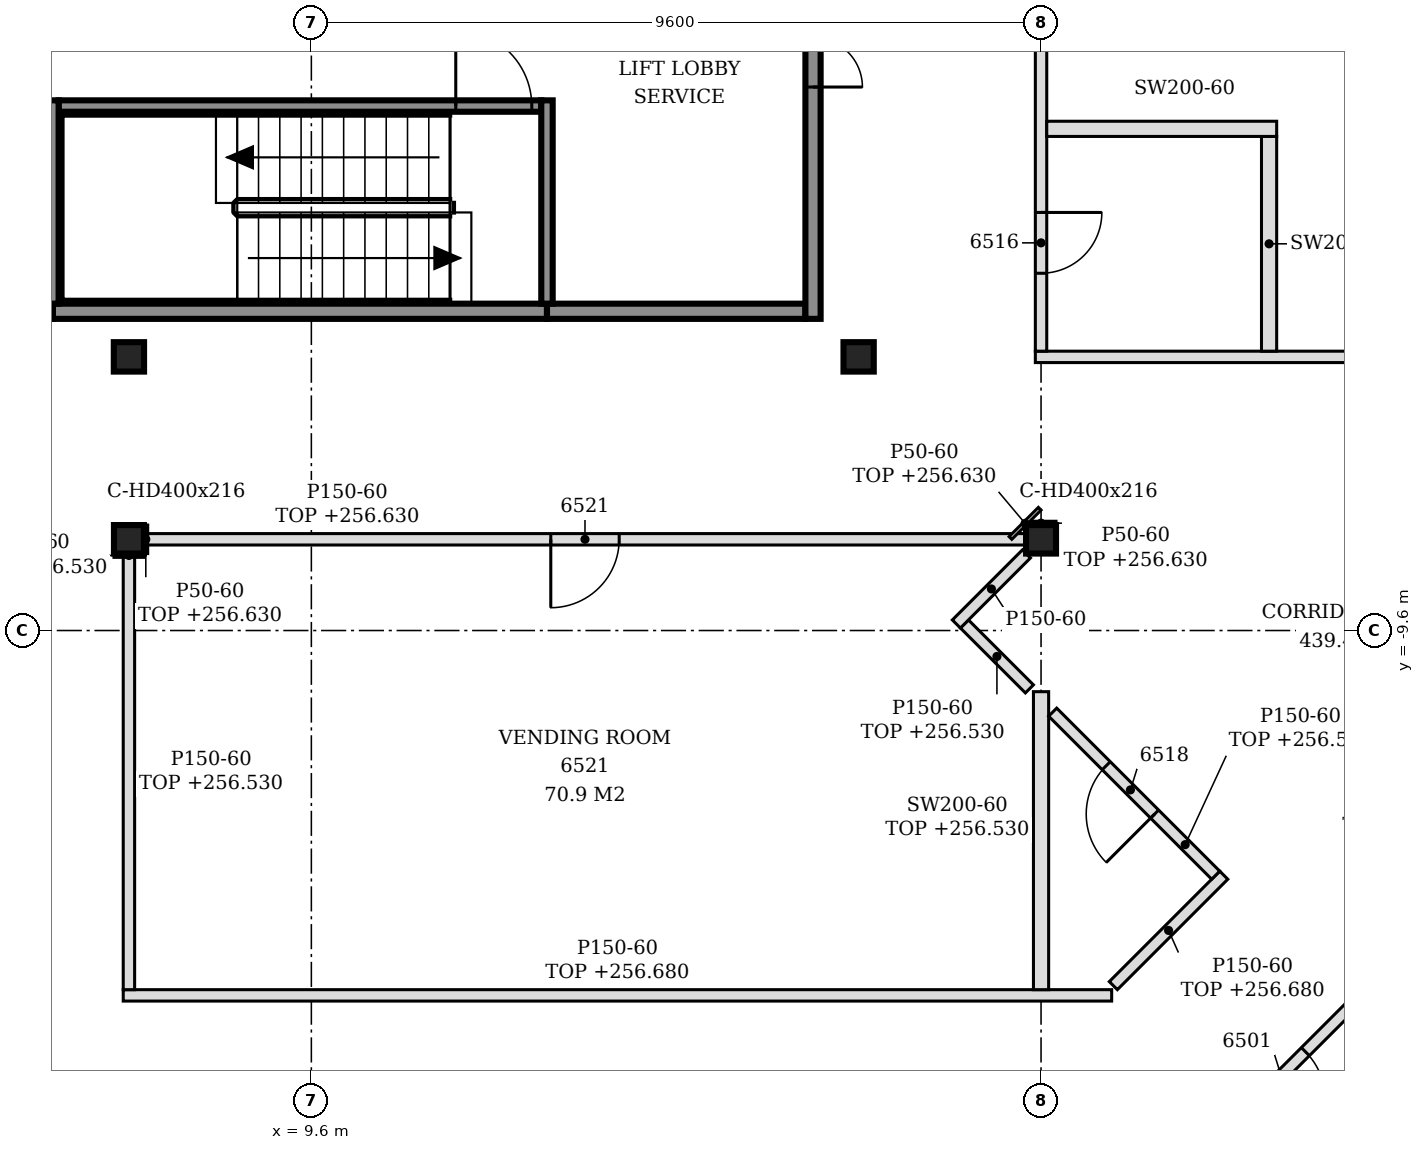
"""IFC4 building model, lengths in metres.
Left out: names, types, materials, properties, quantities, classifications, styles, units other than length and angle.
Written with IfcOpenShell. Run it as: python <this file> out.ifc"""

import sys

from ifc_helpers import new_model, si_unit, direction, frame, frame_2d, origin, origin_2d, place, context, subcontext, project, spatial, polyline, rectangle, i_section, outline, extrude, element, fill, save


model = new_model("IFC4")
c1 = context("Model", 3, precision=1e-05, world=origin(), true_north=direction((0.0, 1.0)))
c2 = subcontext(c1, "Body", "Model", "MODEL_VIEW")
j1 = project(units=[si_unit("LENGTHUNIT", "METRE"), si_unit("PLANEANGLEUNIT", "RADIAN")], contexts=[c1])
p1 = place(None, origin())
s1 = spatial("IfcSite", under=j1, at=p1, CompositionType="ELEMENT")
p2 = place(p1, origin())
s2 = spatial("IfcBuilding", under=s1, at=p2, CompositionType="ELEMENT")
p3 = place(p2, frame((0.0, 0.0, 253.8)))
s3 = spatial("IfcBuildingStorey", under=s2, at=p3, CompositionType="ELEMENT", Elevation=253.8)
for number, where, z_axis, x_axis in (
    (1, (7.2, -8.4, -0.15), (0.0, 0.0, 1.0), (1.0, 0.0, 0.0)),
    (2, (19.2, -8.4, -0.15), (0.0, 0.0, 1.0), (1.0, 0.0, 0.0)),
):
    element("IfcColumn", number, at=place(p3, frame(where, z_axis=z_axis, x_axis=x_axis)), inside=s3, PredefinedType="COLUMN", context=c2, shape_type="SweptSolid", body=[
        extrude(i_section(OverallWidth=0.394, OverallDepth=0.375, WebThickness=0.017, FlangeThickness=0.028, FilletRadius=0.015, at=origin_2d()), origin(), (0.0, 0.0, 1.0), 3.6),
    ])
for number, where, z_axis, x_axis in (
    (3, (7.2, -6.0, -0.15), (0.0, 0.0, 1.0), (1.0, 0.0, 0.0)),
    (4, (16.8, -6.0, -0.15), (0.0, 0.0, 1.0), (1.0, 0.0, 0.0)),
):
    element("IfcColumn", number, at=place(p3, frame(where, z_axis=z_axis, x_axis=x_axis)), inside=s3, PredefinedType="COLUMN", context=c2, shape_type="SweptSolid", body=[
        extrude(i_section(OverallWidth=0.398, OverallDepth=0.387, WebThickness=0.021, FlangeThickness=0.033, FilletRadius=0.015, at=origin_2d()), origin(), (0.0, 0.0, 1.0), 3.6),
    ])
p4 = place(p3, frame((6.2, -5.4, 0.0), z_axis=(0.0, 0.0, 1.0), x_axis=(1.0, 0.0, 0.0)))
e5 = element("IfcWall", 5, at=p4, inside=s3, PredefinedType="SOLIDWALL", context=c2, shape_type="SweptSolid", body=[
    extrude(rectangle(XDim=6.5, YDim=0.2, at=frame_2d((3.25, 0.0))), origin(), (0.0, 0.0, 1.0), 3.45),
])
p5 = place(p3, frame((12.7, -5.4, 0.0), z_axis=(0.0, 0.0, 1.0), x_axis=(1.0, 0.0, 0.0)))
e6 = element("IfcWall", 6, at=p5, inside=s3, PredefinedType="SOLIDWALL", context=c2, shape_type="SweptSolid", body=[
    extrude(rectangle(XDim=3.4, YDim=0.2, at=frame_2d((1.7, 0.0))), origin(), (0.0, 0.0, 1.0), 3.45),
])
p6 = place(p3, frame((6.275, -2.7, 0.0), z_axis=(0.0, 0.0, 1.0), x_axis=(1.0, 0.0, 0.0)))
e7 = element("IfcWall", 7, at=p6, inside=s3, PredefinedType="SOLIDWALL", context=c2, shape_type="SweptSolid", body=[
    extrude(rectangle(XDim=6.35, YDim=0.15, at=frame_2d((3.175, 0.0))), origin(), (0.0, 0.0, 1.0), 3.45),
])
p7 = place(p6, frame((5.225, 0.0, 0.0)))
e8 = element("IfcOpeningElement", 8, at=p7, cuts=e7, PredefinedType="OPENING", context=c2, shape_type="SweptSolid", body=[
    extrude(rectangle(XDim=1.0, YDim=2.1, at=frame_2d((0.5, 1.05))), frame((0.0, 0.085, 0.0), z_axis=(0.0, -1.0, 0.0), x_axis=(1.0, 0.0, 0.0)), (0.0, 0.0, 1.0), 0.17),
])
for number, where, z_axis, x_axis in (
    (9, (6.2, -5.3, 0.0), (0.0, 0.0, 1.0), (0.0, 1.0, 0.0)),
    (10, (12.7, -5.3, 0.0), (0.0, 0.0, 1.0), (0.0, 1.0, 0.0)),
):
    element("IfcWall", number, at=place(p3, frame(where, z_axis=z_axis, x_axis=x_axis)), inside=s3, PredefinedType="SOLIDWALL", context=c2, shape_type="SweptSolid", body=[
        extrude(rectangle(XDim=2.675, YDim=0.15, at=frame_2d((1.337, 0.0))), origin(), (0.0, 0.0, 1.0), 3.45),
    ])
p8 = place(p3, frame((16.2, -5.5, 0.0), z_axis=(0.0, 0.0, 1.0), x_axis=(0.0, 1.0, 0.0)))
e11 = element("IfcWall", 11, at=p8, inside=s3, PredefinedType="SOLIDWALL", context=c2, shape_type="SweptSolid", body=[
    extrude(rectangle(XDim=15.8, YDim=0.2, at=frame_2d((7.9, 0.0))), origin(), (0.0, 0.0, 1.0), 3.45),
])
p9 = place(p8, frame((3.05, 0.0, 0.0)))
e12 = element("IfcOpeningElement", 12, at=p9, cuts=e11, PredefinedType="OPENING", context=c2, shape_type="SweptSolid", body=[
    extrude(rectangle(XDim=1.3, YDim=2.1, at=frame_2d((0.65, 1.05))), frame((0.0, 0.11, 0.0), z_axis=(0.0, -1.0, 0.0), x_axis=(1.0, 0.0, 0.0)), (0.0, 0.0, 1.0), 0.22),
])
p10 = place(p8, frame((11.45, 0.0, 0.0)))
e13 = element("IfcOpeningElement", 13, at=p10, cuts=e11, PredefinedType="OPENING", context=c2, shape_type="SweptSolid", body=[
    extrude(rectangle(XDim=1.3, YDim=2.1, at=frame_2d((0.65, 1.05))), frame((0.0, 0.11, 0.0), z_axis=(0.0, -1.0, 0.0), x_axis=(1.0, 0.0, 0.0)), (0.0, 0.0, 1.0), 0.22),
])
p11 = place(p3, frame((21.146, -16.672, 0.0), z_axis=(0.0, 0.0, 1.0), x_axis=(0.707106781187, 0.707106781187, 0.0)))
e14 = element("IfcWall", 14, at=p11, inside=s3, PredefinedType="PARTITIONING", context=c2, shape_type="SweptSolid", body=[
    extrude(rectangle(XDim=17.719, YDim=0.15, at=frame_2d((8.859, 0.0))), origin(), (0.0, 0.0, 1.0), 2.88),
])
p12 = place(p11, frame((1.266, 0.0, 0.0)))
e15 = element("IfcOpeningElement", 15, at=p12, cuts=e14, PredefinedType="OPENING", context=c2, shape_type="SweptSolid", body=[
    extrude(rectangle(XDim=0.9, YDim=2.1, at=frame_2d((0.45, 1.05))), frame((0.0, 0.085, 0.0), z_axis=(0.0, -1.0, 0.0), x_axis=(1.0, 0.0, 0.0)), (0.0, 0.0, 1.0), 0.17),
])
p13 = place(p11, frame((8.611, 0.0, 0.0)))
e16 = element("IfcOpeningElement", 16, at=p13, cuts=e14, PredefinedType="OPENING", context=c2, shape_type="SweptSolid", body=[
    extrude(rectangle(XDim=0.9, YDim=2.1, at=frame_2d((0.45, 1.05))), frame((0.0, 0.085, 0.0), z_axis=(0.0, -1.0, 0.0), x_axis=(1.0, 0.0, 0.0)), (0.0, 0.0, 1.0), 0.17),
])
p14 = place(p11, frame((13.012, 0.0, 0.0)))
e17 = element("IfcOpeningElement", 17, at=p14, cuts=e14, PredefinedType="OPENING", context=c2, shape_type="SweptSolid", body=[
    extrude(rectangle(XDim=0.9, YDim=2.1, at=frame_2d((0.45, 1.05))), frame((0.0, 0.085, 0.0), z_axis=(0.0, -1.0, 0.0), x_axis=(1.0, 0.0, 0.0)), (0.0, 0.0, 1.0), 0.17),
])
p15 = place(p3, frame((7.125, -14.4, 0.0), z_axis=(0.0, 0.0, 1.0), x_axis=(1.0, 0.0, 0.0)))
e18 = element("IfcWall", 18, at=p15, inside=s3, PredefinedType="PARTITIONING", context=c2, shape_type="SweptSolid", body=[
    extrude(outline(polyline([(0.0, 0.0), (13.004, 0.0), (13.004, 2.88), (12.225, 2.88), (12.223, 2.73), (11.925, 2.73), (11.923, 2.88), (0.225, 2.88), (0.223, 2.73), (0.0, 2.73), (0.0, 0.0)])), frame((0.0, 0.075, 0.0), z_axis=(0.0, -1.0, 0.0), x_axis=(1.0, 0.0, 0.0)), (0.0, 0.0, 1.0), 0.15),
])
p16 = place(p3, frame((7.2, -14.325, 0.0), z_axis=(0.0, 0.0, 1.0), x_axis=(0.0, 1.0, 0.0)))
e19 = element("IfcWall", 19, at=p16, inside=s3, PredefinedType="PARTITIONING", context=c2, shape_type="SweptSolid", body=[
    extrude(rectangle(XDim=5.738, YDim=0.15, at=frame_2d((2.869, 0.0))), origin(), (0.0, 0.0, 1.0), 2.73),
])
p17 = place(p3, frame((19.2, -14.325, 0.0), z_axis=(0.0, 0.0, 1.0), x_axis=(0.0, 1.0, 0.0)))
e20 = element("IfcWall", 20, at=p17, inside=s3, PredefinedType="PARTITIONING", context=c2, shape_type="SweptSolid", body=[
    extrude(rectangle(XDim=3.92, YDim=0.2, at=frame_2d((1.96, 0.0))), origin(), (0.0, 0.0, 1.0), 2.73),
])
p18 = place(p3, frame((20.151, -14.272, 0.0), z_axis=(0.0, 0.0, 1.0), x_axis=(0.707106781187, 0.707106781187, 0.0)))
e21 = element("IfcWall", 21, at=p18, inside=s3, PredefinedType="PARTITIONING", context=c2, shape_type="SweptSolid", body=[
    extrude(rectangle(XDim=2.055, YDim=0.15, at=frame_2d((1.027, 0.0))), origin(), (0.0, 0.0, 1.0), 2.88),
])
p19 = place(p3, frame((21.498, -12.819, 0.0), z_axis=(0.0, 0.0, 1.0), x_axis=(-0.707106781187, 0.707106781187, 0.0)))
e22 = element("IfcWall", 22, at=p19, inside=s3, PredefinedType="PARTITIONING", context=c2, shape_type="SweptSolid", body=[
    extrude(rectangle(XDim=3.033, YDim=0.15, at=frame_2d((1.517, 0.0))), origin(), (0.0, 0.0, 1.0), 2.73),
])
p20 = place(p19, frame((1.137, 0.0, 0.0)))
e23 = element("IfcOpeningElement", 23, at=p20, cuts=e22, PredefinedType="OPENING", context=c2, shape_type="SweptSolid", body=[
    extrude(rectangle(XDim=0.9, YDim=2.1, at=frame_2d((0.45, 1.05))), frame((0.0, 0.085, 0.0), z_axis=(0.0, -1.0, 0.0), x_axis=(1.0, 0.0, 0.0)), (0.0, 0.0, 1.0), 0.17),
])
p21 = place(p3, frame((19.047, -10.368, 0.0), z_axis=(0.0, 0.0, 1.0), x_axis=(-0.707409718716, 0.706803713817, 0.0)))
e24 = element("IfcWall", 24, at=p21, inside=s3, PredefinedType="PARTITIONING", context=c2, shape_type="SweptSolid", body=[
    extrude(rectangle(XDim=1.208, YDim=0.15, at=frame_2d((0.604, 0.0))), origin(), (0.0, 0.0, 1.0), 2.73),
])
p22 = place(p3, frame((18.086, -9.514, 0.0), z_axis=(0.0, 0.0, 1.0), x_axis=(0.707200419109, 0.707013130862, 0.0)))
e25 = element("IfcWall", 25, at=p22, inside=s3, PredefinedType="PARTITIONING", context=c2, shape_type="SweptSolid", body=[
    extrude(rectangle(XDim=1.303, YDim=0.15, at=frame_2d((0.652, 0.0))), origin(), (0.0, 0.0, 1.0), 3.45),
])
p23 = place(p3, frame((7.397, -8.4, 0.0), z_axis=(0.0, 0.0, 1.0), x_axis=(1.0, 0.0, 0.0)))
e26 = element("IfcWall", 26, at=p23, inside=s3, PredefinedType="PARTITIONING", context=c2, shape_type="SweptSolid", body=[
    extrude(rectangle(XDim=11.606, YDim=0.15, at=frame_2d((5.803, 0.0))), origin(), (0.0, 0.0, 1.0), 2.83),
])
p24 = place(p23, frame((5.353, 0.0, 0.0)))
e27 = element("IfcOpeningElement", 27, at=p24, cuts=e26, PredefinedType="OPENING", context=c2, shape_type="SweptSolid", body=[
    extrude(rectangle(XDim=0.9, YDim=2.1, at=frame_2d((0.45, 1.05))), frame((0.0, 0.085, 0.0), z_axis=(0.0, -1.0, 0.0), x_axis=(1.0, 0.0, 0.0)), (0.0, 0.0, 1.0), 0.17),
])
p25 = place(p3, frame((19.125, -6.0, 0.0), z_axis=(0.0, 0.0, 1.0), x_axis=(1.0, 0.0, 0.0)))
e28 = element("IfcWall", 28, at=p25, inside=s3, PredefinedType="PARTITIONING", context=c2, shape_type="SweptSolid", body=[
    extrude(outline(polyline([(0.0, 0.0), (9.405, 0.0), (9.405, 3.45), (0.225, 3.45), (0.223, 2.83), (0.0, 2.83), (0.0, 0.0)])), frame((0.0, 0.075, 0.0), z_axis=(0.0, -1.0, 0.0), x_axis=(1.0, 0.0, 0.0)), (0.0, 0.0, 1.0), 0.15),
])
p26 = place(p3, frame((19.2, -5.925, 0.0), z_axis=(0.0, 0.0, 1.0), x_axis=(0.0, 1.0, 0.0)))
e29 = element("IfcWall", 29, at=p26, inside=s3, PredefinedType="PARTITIONING", context=c2, shape_type="SweptSolid", body=[
    extrude(rectangle(XDim=8.137, YDim=0.15, at=frame_2d((4.069, 0.0))), origin(), (0.0, 0.0, 1.0), 2.83),
])
p27 = place(p26, frame((1.025, 0.0, 0.0)))
e30 = element("IfcOpeningElement", 30, at=p27, cuts=e29, PredefinedType="OPENING", context=c2, shape_type="SweptSolid", body=[
    extrude(rectangle(XDim=0.8, YDim=2.1, at=frame_2d((0.4, 1.05))), frame((0.0, 0.085, 0.0), z_axis=(0.0, -1.0, 0.0), x_axis=(1.0, 0.0, 0.0)), (0.0, 0.0, 1.0), 0.17),
])
p28 = place(p3, frame((22.2, -5.925, 0.0), z_axis=(0.0, 0.0, 1.0), x_axis=(0.0, 1.0, 0.0)))
e31 = element("IfcWall", 31, at=p28, inside=s3, PredefinedType="PARTITIONING", context=c2, shape_type="SweptSolid", body=[
    extrude(outline(polyline([(0.0, 0.0), (2.825, 0.0), (2.825, 3.45), (1.23, 3.45), (1.228, 2.88), (1.02, 2.88), (1.018, 3.45), (0.0, 3.45), (0.0, 0.0)])), frame((0.0, 0.1, 0.0), z_axis=(0.0, -1.0, 0.0), x_axis=(1.0, 0.0, 0.0)), (0.0, 0.0, 1.0), 0.2),
])
p29 = place(p3, frame((19.275, -3.0, 0.0), z_axis=(0.0, 0.0, 1.0), x_axis=(1.0, 0.0, 0.0)))
e32 = element("IfcWall", 32, at=p29, inside=s3, PredefinedType="PARTITIONING", context=c2, shape_type="SweptSolid", body=[
    extrude(outline(polyline([(0.0, 0.0), (3.025, 0.0), (3.025, 3.45), (0.075, 3.45), (0.073, 2.83), (0.0, 2.83), (0.0, 0.0)])), frame((0.0, 0.1, 0.0), z_axis=(0.0, -1.0, 0.0), x_axis=(1.0, 0.0, 0.0)), (0.0, 0.0, 1.0), 0.2),
])
p30 = place(p3, frame((7.422, -8.587, 0.0), z_axis=(0.0, 0.0, 1.0), x_axis=(0.0, 1.0, 0.0)))
e33 = element("IfcWall", 33, at=p30, inside=s3, PredefinedType="PARTITIONING", context=c2, shape_type="SweptSolid", body=[
    extrude(rectangle(XDim=0.375, YDim=0.05, at=frame_2d((0.188, 0.0))), origin(), (0.0, 0.0, 1.0), 2.83),
])
p31 = place(p3, frame((18.798, -8.382, 0.0), z_axis=(0.0, 0.0, 1.0), x_axis=(0.707106781187, 0.707106781187, 0.0)))
e34 = element("IfcWall", 34, at=p31, inside=s3, PredefinedType="PARTITIONING", context=c2, shape_type="SweptSolid", body=[
    extrude(rectangle(XDim=0.544, YDim=0.05, at=frame_2d((0.272, 0.0))), origin(), (0.0, 0.0, 1.0), 2.83),
])
p32 = place(p3, frame((7.003, -8.613, 0.0), z_axis=(0.0, 0.0, 1.0), x_axis=(1.0, 0.0, 0.0)))
e35 = element("IfcWall", 35, at=p32, inside=s3, PredefinedType="PARTITIONING", context=c2, shape_type="SweptSolid", body=[
    extrude(rectangle(XDim=0.394, YDim=0.05, at=frame_2d((0.197, 0.0))), origin(), (0.0, 0.0, 1.0), 2.73),
])
p33 = place(p3, frame((19.003, -8.188, 0.0), z_axis=(0.0, 0.0, 1.0), x_axis=(1.0, 0.0, 0.0)))
e36 = element("IfcWall", 36, at=p33, inside=s3, PredefinedType="PARTITIONING", context=c2, shape_type="SweptSolid", body=[
    extrude(rectangle(XDim=0.394, YDim=0.05, at=frame_2d((0.197, 0.0))), origin(), (0.0, 0.0, 1.0), 2.83),
])
p34 = place(p7, origin())
e37 = element("IfcDoor", 37, at=p34, inside=s3, OperationType="SINGLE_SWING_LEFT", PredefinedType="DOOR", context=c2, shape_type="SweptSolid", body=[
    extrude(rectangle(XDim=1.0, YDim=2.1, at=frame_2d((0.5, 1.05))), frame((0.0, 0.025, 0.0), z_axis=(0.0, -1.0, 0.0), x_axis=(1.0, 0.0, 0.0)), (0.0, 0.0, 1.0), 0.05),
])
fill(e8, e37)
p35 = place(p9, origin())
e38 = element("IfcDoor", 38, at=p35, inside=s3, OperationType="DOUBLE_DOOR_SINGLE_SWING", PredefinedType="DOOR", context=c2, shape_type="SweptSolid", body=[
    extrude(rectangle(XDim=1.3, YDim=2.1, at=frame_2d((0.65, 1.05))), frame((0.0, 0.025, 0.0), z_axis=(0.0, -1.0, 0.0), x_axis=(1.0, 0.0, 0.0)), (0.0, 0.0, 1.0), 0.05),
])
fill(e12, e38)
p36 = place(p12, frame((0.9, 0.0, 0.0), z_axis=(0.0, 0.0, 1.0), x_axis=(-1.0, 0.0, 0.0)))
e39 = element("IfcDoor", 39, at=p36, inside=s3, OperationType="SINGLE_SWING_RIGHT", PredefinedType="DOOR", context=c2, shape_type="SweptSolid", body=[
    extrude(rectangle(XDim=0.9, YDim=2.1, at=frame_2d((0.45, 1.05))), frame((0.0, 0.025, 0.0), z_axis=(0.0, -1.0, 0.0), x_axis=(1.0, 0.0, 0.0)), (0.0, 0.0, 1.0), 0.05),
])
fill(e15, e39)
p37 = place(p27, frame((0.8, 0.0, 0.0), z_axis=(0.0, 0.0, 1.0), x_axis=(-1.0, 0.0, 0.0)))
e40 = element("IfcDoor", 40, at=p37, inside=s3, OperationType="SINGLE_SWING_LEFT", PredefinedType="DOOR", context=c2, shape_type="SweptSolid", body=[
    extrude(rectangle(XDim=0.8, YDim=2.1, at=frame_2d((0.4, 1.05))), frame((0.0, 0.025, 0.0), z_axis=(0.0, -1.0, 0.0), x_axis=(1.0, 0.0, 0.0)), (0.0, 0.0, 1.0), 0.05),
])
fill(e30, e40)
p38 = place(p20, origin())
e41 = element("IfcDoor", 41, at=p38, inside=s3, OperationType="SINGLE_SWING_LEFT", PredefinedType="DOOR", context=c2, shape_type="SweptSolid", body=[
    extrude(rectangle(XDim=0.9, YDim=2.1, at=frame_2d((0.45, 1.05))), frame((0.0, 0.025, 0.0), z_axis=(0.0, -1.0, 0.0), x_axis=(1.0, 0.0, 0.0)), (0.0, 0.0, 1.0), 0.05),
])
fill(e23, e41)
p39 = place(p24, frame((0.9, 0.0, 0.0), z_axis=(0.0, 0.0, 1.0), x_axis=(-1.0, 0.0, 0.0)))
e42 = element("IfcDoor", 42, at=p39, inside=s3, OperationType="SINGLE_SWING_RIGHT", PredefinedType="DOOR", context=c2, shape_type="SweptSolid", body=[
    extrude(rectangle(XDim=0.9, YDim=2.1, at=frame_2d((0.45, 1.05))), frame((0.0, 0.025, 0.0), z_axis=(0.0, -1.0, 0.0), x_axis=(1.0, 0.0, 0.0)), (0.0, 0.0, 1.0), 0.05),
])
fill(e27, e42)
save(model, sys.argv[1])
